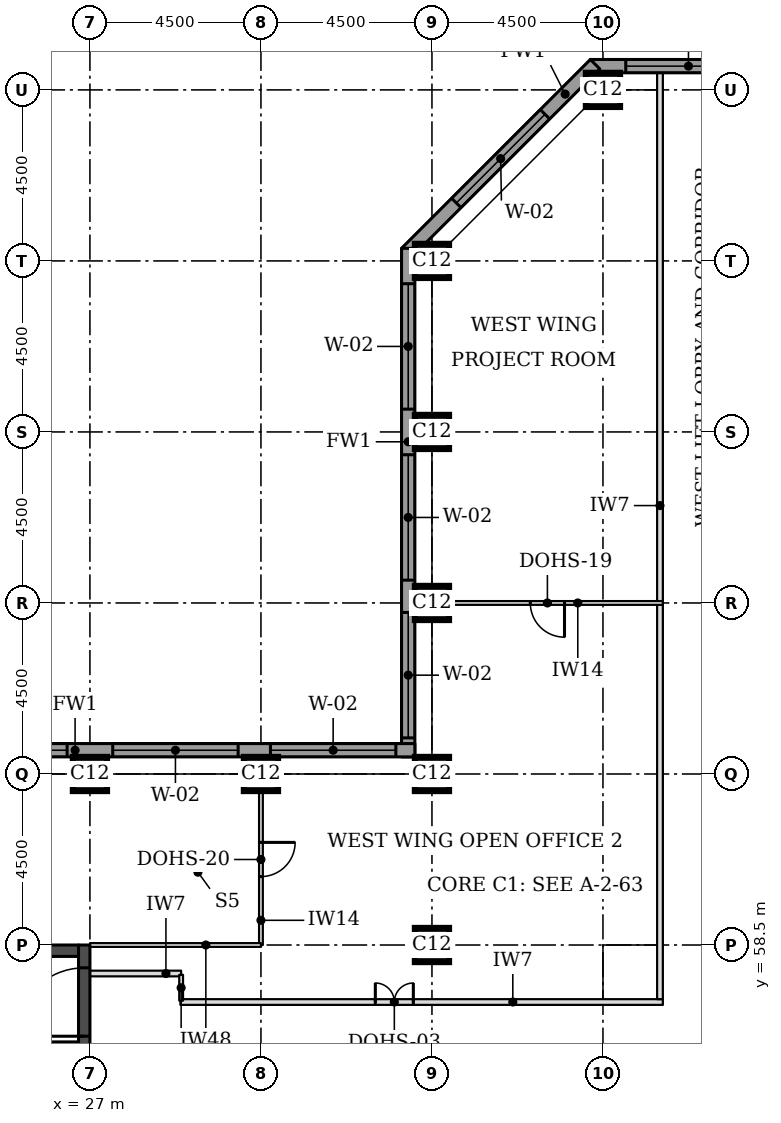
"""IFC4 building model, lengths in metres.
Left out: names, types, materials, properties, quantities, classifications, styles, units other than length and angle.
Written with IfcOpenShell. Run it as: python <this file> out.ifc"""

import sys

from ifc_helpers import new_model, si_unit, direction, frame, frame_2d, origin, origin_2d, place, context, subcontext, project, spatial, rectangle, extrude, element, fill, save


model = new_model("IFC4")
c1 = context("Model", 3, precision=1e-05, world=origin(), true_north=direction((0.0, 1.0)))
c2 = subcontext(c1, "Body", "Model", "MODEL_VIEW")
j1 = project(units=[si_unit("LENGTHUNIT", "METRE"), si_unit("PLANEANGLEUNIT", "RADIAN")], contexts=[c1])
p1 = place(None, origin())
s1 = spatial("IfcSite", under=j1, at=p1, CompositionType="ELEMENT")
p2 = place(p1, origin())
s2 = spatial("IfcBuilding", under=s1, at=p2, CompositionType="ELEMENT")
p3 = place(p2, frame((0.0, 0.0, 260.0)))
s3 = spatial("IfcBuildingStorey", under=s2, at=p3, CompositionType="ELEMENT", Elevation=260.0)
for number, where, z_axis, x_axis in (
    (1, (36.0, 58.5, 0.0), (0.0, 0.0, 1.0), (1.0, 0.0, 0.0)),
    (2, (27.0, 63.0, 0.0), (0.0, 0.0, 1.0), (1.0, 0.0, 0.0)),
    (3, (31.5, 63.0, 0.0), (0.0, 0.0, 1.0), (1.0, 0.0, 0.0)),
    (4, (36.0, 63.0, 0.0), (0.0, 0.0, 1.0), (1.0, 0.0, 0.0)),
    (5, (36.0, 67.5, 0.0), (0.0, 0.0, 1.0), (1.0, 0.0, 0.0)),
    (6, (36.0, 72.0, 0.0), (0.0, 0.0, 1.0), (1.0, 0.0, 0.0)),
    (7, (36.0, 76.5, 0.0), (0.0, 0.0, 1.0), (1.0, 0.0, 0.0)),
    (8, (40.5, 81.0, 0.0), (0.0, 0.0, 1.0), (1.0, 0.0, 0.0)),
):
    element("IfcColumn", number, at=place(p3, frame(where, z_axis=z_axis, x_axis=x_axis)), inside=s3, PredefinedType="COLUMN", context=c2, shape_type="SweptSolid", body=[
        extrude(rectangle(XDim=0.9, YDim=0.9, at=origin_2d()), origin(), (0.0, 0.0, 1.0), 3.7),
    ])
p4 = place(p3, frame((18.3, 58.35, 0.0), z_axis=(0.0, 0.0, 1.0), x_axis=(1.0, 0.0, 0.0)))
e9 = element("IfcWall", 9, at=p4, inside=s3, PredefinedType="SHEAR", context=c2, shape_type="SweptSolid", body=[
    extrude(rectangle(XDim=8.4, YDim=0.3, at=frame_2d((4.2, 0.0))), origin(), (0.0, 0.0, 1.0), 3.7),
])
p5 = place(p3, frame((26.85, 49.5, 0.0), z_axis=(0.0, 0.0, 1.0), x_axis=(0.0, 1.0, 0.0)))
e10 = element("IfcWall", 10, at=p5, inside=s3, PredefinedType="SHEAR", context=c2, shape_type="SweptSolid", body=[
    extrude(rectangle(XDim=9.0, YDim=0.3, at=frame_2d((4.5, 0.0))), origin(), (0.0, 0.0, 1.0), 3.7),
])
p6 = place(p5, frame((6.6, 0.0, 0.0)))
e11 = element("IfcOpeningElement", 11, at=p6, cuts=e10, PredefinedType="OPENING", context=c2, shape_type="SweptSolid", body=[
    extrude(rectangle(XDim=1.8, YDim=2.1, at=frame_2d((0.9, 1.05))), frame((0.0, 0.16, 0.0), z_axis=(0.0, -1.0, 0.0), x_axis=(1.0, 0.0, 0.0)), (0.0, 0.0, 1.0), 0.32),
])
p7 = place(p3, frame((72.331, 81.625, 0.0), z_axis=(0.0, 0.0, 1.0), x_axis=(-1.0, 0.0, 0.0)))
e12 = element("IfcWall", 12, at=p7, inside=s3, PredefinedType="STANDARD", context=c2, shape_type="SweptSolid", body=[
    extrude(rectangle(XDim=32.163, YDim=0.35, at=frame_2d((16.081, 0.0))), origin(), (0.0, 0.0, 1.0), 3.425),
])
p8 = place(p7, frame((0.931, 0.0, 0.9)))
e13 = element("IfcOpeningElement", 13, at=p8, cuts=e12, PredefinedType="OPENING", context=c2, shape_type="SweptSolid", body=[
    extrude(rectangle(XDim=3.3, YDim=1.9, at=frame_2d((1.65, 0.95))), frame((0.0, 0.185, 0.0), z_axis=(0.0, -1.0, 0.0), x_axis=(1.0, 0.0, 0.0)), (0.0, 0.0, 1.0), 0.37),
])
p9 = place(p7, frame((5.431, 0.0, 0.9)))
e14 = element("IfcOpeningElement", 14, at=p9, cuts=e12, PredefinedType="OPENING", context=c2, shape_type="SweptSolid", body=[
    extrude(rectangle(XDim=3.3, YDim=1.9, at=frame_2d((1.65, 0.95))), frame((0.0, 0.185, 0.0), z_axis=(0.0, -1.0, 0.0), x_axis=(1.0, 0.0, 0.0)), (0.0, 0.0, 1.0), 0.37),
])
p10 = place(p7, frame((9.931, 0.0, 0.9)))
e15 = element("IfcOpeningElement", 15, at=p10, cuts=e12, PredefinedType="OPENING", context=c2, shape_type="SweptSolid", body=[
    extrude(rectangle(XDim=3.3, YDim=1.9, at=frame_2d((1.65, 0.95))), frame((0.0, 0.185, 0.0), z_axis=(0.0, -1.0, 0.0), x_axis=(1.0, 0.0, 0.0)), (0.0, 0.0, 1.0), 0.37),
])
p11 = place(p7, frame((14.431, 0.0, 0.9)))
e16 = element("IfcOpeningElement", 16, at=p11, cuts=e12, PredefinedType="OPENING", context=c2, shape_type="SweptSolid", body=[
    extrude(rectangle(XDim=3.3, YDim=1.9, at=frame_2d((1.65, 0.95))), frame((0.0, 0.185, 0.0), z_axis=(0.0, -1.0, 0.0), x_axis=(1.0, 0.0, 0.0)), (0.0, 0.0, 1.0), 0.37),
])
p12 = place(p7, frame((18.931, 0.0, 0.9)))
e17 = element("IfcOpeningElement", 17, at=p12, cuts=e12, PredefinedType="OPENING", context=c2, shape_type="SweptSolid", body=[
    extrude(rectangle(XDim=3.3, YDim=1.9, at=frame_2d((1.65, 0.95))), frame((0.0, 0.185, 0.0), z_axis=(0.0, -1.0, 0.0), x_axis=(1.0, 0.0, 0.0)), (0.0, 0.0, 1.0), 0.37),
])
p13 = place(p7, frame((23.431, 0.0, 0.9)))
e18 = element("IfcOpeningElement", 18, at=p13, cuts=e12, PredefinedType="OPENING", context=c2, shape_type="SweptSolid", body=[
    extrude(rectangle(XDim=3.3, YDim=1.9, at=frame_2d((1.65, 0.95))), frame((0.0, 0.185, 0.0), z_axis=(0.0, -1.0, 0.0), x_axis=(1.0, 0.0, 0.0)), (0.0, 0.0, 1.0), 0.37),
])
p14 = place(p7, frame((27.931, 0.0, 0.9)))
e19 = element("IfcOpeningElement", 19, at=p14, cuts=e12, PredefinedType="OPENING", context=c2, shape_type="SweptSolid", body=[
    extrude(rectangle(XDim=3.3, YDim=1.9, at=frame_2d((1.65, 0.95))), frame((0.0, 0.185, 0.0), z_axis=(0.0, -1.0, 0.0), x_axis=(1.0, 0.0, 0.0)), (0.0, 0.0, 1.0), 0.37),
])
p15 = place(p3, frame((40.292, 81.676, 0.0), z_axis=(0.0, 0.0, 1.0), x_axis=(-0.707106781187, -0.707106781187, 0.0)))
e20 = element("IfcWall", 20, at=p15, inside=s3, PredefinedType="STANDARD", context=c2, shape_type="SweptSolid", body=[
    extrude(rectangle(XDim=7.027, YDim=0.35, at=frame_2d((3.513, 0.0))), origin(), (0.0, 0.0, 1.0), 3.425),
])
p16 = place(p15, frame((1.863, 0.0, 0.9)))
e21 = element("IfcOpeningElement", 21, at=p16, cuts=e20, PredefinedType="OPENING", context=c2, shape_type="SweptSolid", body=[
    extrude(rectangle(XDim=3.3, YDim=1.9, at=frame_2d((1.65, 0.95))), frame((0.0, 0.185, 0.0), z_axis=(0.0, -1.0, 0.0), x_axis=(1.0, 0.0, 0.0)), (0.0, 0.0, 1.0), 0.37),
])
p17 = place(p3, frame((35.375, 76.831, 0.0), z_axis=(0.0, 0.0, 1.0), x_axis=(0.0, -1.0, 0.0)))
e22 = element("IfcWall", 22, at=p17, inside=s3, PredefinedType="STANDARD", context=c2, shape_type="SweptSolid", body=[
    extrude(rectangle(XDim=13.381, YDim=0.35, at=frame_2d((6.691, 0.0))), origin(), (0.0, 0.0, 1.0), 3.425),
])
p18 = place(p17, frame((0.931, 0.0, 0.9)))
e23 = element("IfcOpeningElement", 23, at=p18, cuts=e22, PredefinedType="OPENING", context=c2, shape_type="SweptSolid", body=[
    extrude(rectangle(XDim=3.3, YDim=1.9, at=frame_2d((1.65, 0.95))), frame((0.0, 0.185, 0.0), z_axis=(0.0, -1.0, 0.0), x_axis=(1.0, 0.0, 0.0)), (0.0, 0.0, 1.0), 0.37),
])
p19 = place(p17, frame((5.431, 0.0, 0.9)))
e24 = element("IfcOpeningElement", 24, at=p19, cuts=e22, PredefinedType="OPENING", context=c2, shape_type="SweptSolid", body=[
    extrude(rectangle(XDim=3.3, YDim=1.9, at=frame_2d((1.65, 0.95))), frame((0.0, 0.185, 0.0), z_axis=(0.0, -1.0, 0.0), x_axis=(1.0, 0.0, 0.0)), (0.0, 0.0, 1.0), 0.37),
])
p20 = place(p17, frame((9.581, 0.0, 0.9)))
e25 = element("IfcOpeningElement", 25, at=p20, cuts=e22, PredefinedType="OPENING", context=c2, shape_type="SweptSolid", body=[
    extrude(rectangle(XDim=3.3, YDim=1.9, at=frame_2d((1.65, 0.95))), frame((0.0, 0.185, 0.0), z_axis=(0.0, -1.0, 0.0), x_axis=(1.0, 0.0, 0.0)), (0.0, 0.0, 1.0), 0.37),
])
p21 = place(p3, frame((35.55, 63.625, 0.0), z_axis=(0.0, 0.0, 1.0), x_axis=(-1.0, 0.0, 0.0)))
e26 = element("IfcWall", 26, at=p21, inside=s3, PredefinedType="STANDARD", context=c2, shape_type="SweptSolid", body=[
    extrude(rectangle(XDim=17.881, YDim=0.35, at=frame_2d((8.941, 0.0))), origin(), (0.0, 0.0, 1.0), 3.375),
])
p22 = place(p21, frame((0.5, 0.0, 0.9)))
e27 = element("IfcOpeningElement", 27, at=p22, cuts=e26, PredefinedType="OPENING", context=c2, shape_type="SweptSolid", body=[
    extrude(rectangle(XDim=3.3, YDim=1.9, at=frame_2d((1.65, 0.95))), frame((0.0, 0.185, 0.0), z_axis=(0.0, -1.0, 0.0), x_axis=(1.0, 0.0, 0.0)), (0.0, 0.0, 1.0), 0.37),
])
p23 = place(p21, frame((4.65, 0.0, 0.9)))
e28 = element("IfcOpeningElement", 28, at=p23, cuts=e26, PredefinedType="OPENING", context=c2, shape_type="SweptSolid", body=[
    extrude(rectangle(XDim=3.3, YDim=1.9, at=frame_2d((1.65, 0.95))), frame((0.0, 0.185, 0.0), z_axis=(0.0, -1.0, 0.0), x_axis=(1.0, 0.0, 0.0)), (0.0, 0.0, 1.0), 0.37),
])
p24 = place(p21, frame((9.15, 0.0, 0.9)))
e29 = element("IfcOpeningElement", 29, at=p24, cuts=e26, PredefinedType="OPENING", context=c2, shape_type="SweptSolid", body=[
    extrude(rectangle(XDim=3.3, YDim=1.9, at=frame_2d((1.65, 0.95))), frame((0.0, 0.185, 0.0), z_axis=(0.0, -1.0, 0.0), x_axis=(1.0, 0.0, 0.0)), (0.0, 0.0, 1.0), 0.37),
])
p25 = place(p21, frame((13.65, 0.0, 0.9)))
e30 = element("IfcOpeningElement", 30, at=p25, cuts=e26, PredefinedType="OPENING", context=c2, shape_type="SweptSolid", body=[
    extrude(rectangle(XDim=3.3, YDim=1.9, at=frame_2d((1.65, 0.95))), frame((0.0, 0.185, 0.0), z_axis=(0.0, -1.0, 0.0), x_axis=(1.0, 0.0, 0.0)), (0.0, 0.0, 1.0), 0.37),
])
p26 = place(p3, frame((29.38, 57.0, 0.0), z_axis=(0.0, 0.0, 1.0), x_axis=(1.0, 0.0, 0.0)))
e31 = element("IfcWall", 31, at=p26, inside=s3, PredefinedType="PARTITIONING", context=c2, shape_type="SweptSolid", body=[
    extrude(rectangle(XDim=12.695, YDim=0.15, at=frame_2d((6.348, 0.0))), origin(), (0.0, 0.0, 1.0), 3.45),
])
p27 = place(p26, frame((5.13, 0.0, 0.0)))
e32 = element("IfcOpeningElement", 32, at=p27, cuts=e31, PredefinedType="OPENING", context=c2, shape_type="SweptSolid", body=[
    extrude(rectangle(XDim=1.0, YDim=2.1, at=frame_2d((0.5, 1.05))), frame((0.0, 0.085, 0.0), z_axis=(0.0, -1.0, 0.0), x_axis=(1.0, 0.0, 0.0)), (0.0, 0.0, 1.0), 0.17),
])
p28 = place(p3, frame((42.0, 57.075, 0.0), z_axis=(0.0, 0.0, 1.0), x_axis=(0.0, 1.0, 0.0)))
e33 = element("IfcWall", 33, at=p28, inside=s3, PredefinedType="PARTITIONING", context=c2, shape_type="SweptSolid", body=[
    extrude(rectangle(XDim=24.375, YDim=0.15, at=frame_2d((12.188, 0.0))), origin(), (0.0, 0.0, 1.0), 3.45),
])
p29 = place(p3, frame((36.0, 67.5, 0.0), z_axis=(0.0, 0.0, 1.0), x_axis=(1.0, 0.0, 0.0)))
e34 = element("IfcWall", 34, at=p29, inside=s3, PredefinedType="PARTITIONING", context=c2, shape_type="SweptSolid", body=[
    extrude(rectangle(XDim=6.075, YDim=0.1, at=frame_2d((3.038, 0.0))), origin(), (0.0, 0.0, 1.0), 3.45),
])
p30 = place(p29, frame((2.588, 0.0, 0.0)))
e35 = element("IfcOpeningElement", 35, at=p30, cuts=e34, PredefinedType="OPENING", context=c2, shape_type="SweptSolid", body=[
    extrude(rectangle(XDim=0.9, YDim=2.1, at=frame_2d((0.45, 1.05))), frame((0.0, 0.06, 0.0), z_axis=(0.0, -1.0, 0.0), x_axis=(1.0, 0.0, 0.0)), (0.0, 0.0, 1.0), 0.12),
])
p31 = place(p3, frame((31.5, 63.0, 0.0), z_axis=(0.0, 0.0, 1.0), x_axis=(0.0, -1.0, 0.0)))
e36 = element("IfcWall", 36, at=p31, inside=s3, PredefinedType="PARTITIONING", context=c2, shape_type="SweptSolid", body=[
    extrude(rectangle(XDim=4.5, YDim=0.1, at=frame_2d((2.25, 0.0))), origin(), (0.0, 0.0, 1.0), 3.45),
])
p32 = place(p31, frame((1.8, 0.0, 0.0)))
e37 = element("IfcOpeningElement", 37, at=p32, cuts=e36, PredefinedType="OPENING", context=c2, shape_type="SweptSolid", body=[
    extrude(rectangle(XDim=0.9, YDim=2.1, at=frame_2d((0.45, 1.05))), frame((0.0, 0.06, 0.0), z_axis=(0.0, -1.0, 0.0), x_axis=(1.0, 0.0, 0.0)), (0.0, 0.0, 1.0), 0.12),
])
p33 = place(p3, frame((31.5, 58.5, 0.0), z_axis=(0.0, 0.0, 1.0), x_axis=(-1.0, 0.0, 0.0)))
e38 = element("IfcWall", 38, at=p33, inside=s3, PredefinedType="PARTITIONING", context=c2, shape_type="SweptSolid", body=[
    extrude(rectangle(XDim=4.5, YDim=0.1, at=frame_2d((2.25, 0.0))), origin(), (0.0, 0.0, 1.0), 2.4),
])
p34 = place(p3, frame((27.0, 57.75, 0.0), z_axis=(0.0, 0.0, 1.0), x_axis=(1.0, 0.0, 0.0)))
e39 = element("IfcWall", 39, at=p34, inside=s3, PredefinedType="PARTITIONING", context=c2, shape_type="SweptSolid", body=[
    extrude(rectangle(XDim=2.4, YDim=0.15, at=frame_2d((1.2, 0.0))), origin(), (0.0, 0.0, 1.0), 3.45),
])
p35 = place(p3, frame((29.4, 57.715, 0.0), z_axis=(0.0, 0.0, 1.0), x_axis=(0.0, -1.0, 0.0)))
e40 = element("IfcWall", 40, at=p35, inside=s3, PredefinedType="PARTITIONING", context=c2, shape_type="SweptSolid", body=[
    extrude(rectangle(XDim=0.68, YDim=0.1, at=frame_2d((0.34, 0.0))), origin(), (0.0, 0.0, 1.0), 3.45),
])
p36 = place(p3, frame((23.2, 55.85, 0.0), z_axis=(0.0, 0.0, 1.0), x_axis=(1.0, 0.0, 0.0)))
e41 = element("IfcWall", 41, at=p36, inside=s3, PredefinedType="SOLIDWALL", context=c2, shape_type="SweptSolid", body=[
    extrude(rectangle(XDim=3.5, YDim=0.2, at=frame_2d((1.75, 0.0))), origin(), (0.0, 0.0, 1.0), 3.45),
])
p37 = place(p36, frame((1.2, 0.0, 0.0)))
e42 = element("IfcOpeningElement", 42, at=p37, cuts=e41, PredefinedType="OPENING", context=c2, shape_type="SweptSolid", body=[
    extrude(rectangle(XDim=1.1, YDim=2.1, at=frame_2d((0.55, 1.05))), frame((0.0, 0.11, 0.0), z_axis=(0.0, -1.0, 0.0), x_axis=(1.0, 0.0, 0.0)), (0.0, 0.0, 1.0), 0.22),
])
p38 = place(p14, origin())
e43 = element("IfcWindow", 43, at=p38, inside=s3, PartitioningType="SINGLE_PANEL", PredefinedType="WINDOW", context=c2, shape_type="SweptSolid", body=[
    extrude(rectangle(XDim=3.3, YDim=1.9, at=frame_2d((1.65, 0.95))), frame((0.0, 0.085, 0.0), z_axis=(0.0, -1.0, 0.0), x_axis=(1.0, 0.0, 0.0)), (0.0, 0.0, 1.0), 0.06),
])
fill(e19, e43)
p39 = place(p16, origin())
e44 = element("IfcWindow", 44, at=p39, inside=s3, PartitioningType="SINGLE_PANEL", PredefinedType="WINDOW", context=c2, shape_type="SweptSolid", body=[
    extrude(rectangle(XDim=3.3, YDim=1.9, at=frame_2d((1.65, 0.95))), frame((0.0, 0.085, 0.0), z_axis=(0.0, -1.0, 0.0), x_axis=(1.0, 0.0, 0.0)), (0.0, 0.0, 1.0), 0.06),
])
fill(e21, e44)
p40 = place(p18, origin())
e45 = element("IfcWindow", 45, at=p40, inside=s3, PartitioningType="SINGLE_PANEL", PredefinedType="WINDOW", context=c2, shape_type="SweptSolid", body=[
    extrude(rectangle(XDim=3.3, YDim=1.9, at=frame_2d((1.65, 0.95))), frame((0.0, 0.085, 0.0), z_axis=(0.0, -1.0, 0.0), x_axis=(1.0, 0.0, 0.0)), (0.0, 0.0, 1.0), 0.06),
])
fill(e23, e45)
p41 = place(p19, origin())
e46 = element("IfcWindow", 46, at=p41, inside=s3, PartitioningType="SINGLE_PANEL", PredefinedType="WINDOW", context=c2, shape_type="SweptSolid", body=[
    extrude(rectangle(XDim=3.3, YDim=1.9, at=frame_2d((1.65, 0.95))), frame((0.0, 0.085, 0.0), z_axis=(0.0, -1.0, 0.0), x_axis=(1.0, 0.0, 0.0)), (0.0, 0.0, 1.0), 0.06),
])
fill(e24, e46)
p42 = place(p20, origin())
e47 = element("IfcWindow", 47, at=p42, inside=s3, PartitioningType="SINGLE_PANEL", PredefinedType="WINDOW", context=c2, shape_type="SweptSolid", body=[
    extrude(rectangle(XDim=3.3, YDim=1.9, at=frame_2d((1.65, 0.95))), frame((0.0, 0.085, 0.0), z_axis=(0.0, -1.0, 0.0), x_axis=(1.0, 0.0, 0.0)), (0.0, 0.0, 1.0), 0.06),
])
fill(e25, e47)
p43 = place(p22, origin())
e48 = element("IfcWindow", 48, at=p43, inside=s3, PartitioningType="SINGLE_PANEL", PredefinedType="WINDOW", context=c2, shape_type="SweptSolid", body=[
    extrude(rectangle(XDim=3.3, YDim=1.9, at=frame_2d((1.65, 0.95))), frame((0.0, 0.085, 0.0), z_axis=(0.0, -1.0, 0.0), x_axis=(1.0, 0.0, 0.0)), (0.0, 0.0, 1.0), 0.06),
])
fill(e27, e48)
p44 = place(p23, origin())
e49 = element("IfcWindow", 49, at=p44, inside=s3, PartitioningType="SINGLE_PANEL", PredefinedType="WINDOW", context=c2, shape_type="SweptSolid", body=[
    extrude(rectangle(XDim=3.3, YDim=1.9, at=frame_2d((1.65, 0.95))), frame((0.0, 0.085, 0.0), z_axis=(0.0, -1.0, 0.0), x_axis=(1.0, 0.0, 0.0)), (0.0, 0.0, 1.0), 0.06),
])
fill(e28, e49)
p45 = place(p24, origin())
e50 = element("IfcWindow", 50, at=p45, inside=s3, PartitioningType="SINGLE_PANEL", PredefinedType="WINDOW", context=c2, shape_type="SweptSolid", body=[
    extrude(rectangle(XDim=3.3, YDim=1.9, at=frame_2d((1.65, 0.95))), frame((0.0, 0.085, 0.0), z_axis=(0.0, -1.0, 0.0), x_axis=(1.0, 0.0, 0.0)), (0.0, 0.0, 1.0), 0.06),
])
fill(e29, e50)
p46 = place(p27, origin())
e51 = element("IfcDoor", 51, at=p46, inside=s3, OperationType="DOUBLE_DOOR_SINGLE_SWING", PredefinedType="DOOR", context=c2, shape_type="SweptSolid", body=[
    extrude(rectangle(XDim=1.0, YDim=2.1, at=frame_2d((0.5, 1.05))), frame((0.0, 0.025, 0.0), z_axis=(0.0, -1.0, 0.0), x_axis=(1.0, 0.0, 0.0)), (0.0, 0.0, 1.0), 0.05),
])
fill(e32, e51)
p47 = place(p32, origin())
e52 = element("IfcDoor", 52, at=p47, inside=s3, OperationType="SINGLE_SWING_LEFT", PredefinedType="DOOR", context=c2, shape_type="SweptSolid", body=[
    extrude(rectangle(XDim=0.9, YDim=2.1, at=frame_2d((0.45, 1.05))), frame((0.0, 0.025, 0.0), z_axis=(0.0, -1.0, 0.0), x_axis=(1.0, 0.0, 0.0)), (0.0, 0.0, 1.0), 0.05),
])
fill(e37, e52)
p48 = place(p30, frame((0.9, 0.0, 0.0), z_axis=(0.0, 0.0, 1.0), x_axis=(-1.0, 0.0, 0.0)))
e53 = element("IfcDoor", 53, at=p48, inside=s3, OperationType="SINGLE_SWING_LEFT", PredefinedType="DOOR", context=c2, shape_type="SweptSolid", body=[
    extrude(rectangle(XDim=0.9, YDim=2.1, at=frame_2d((0.45, 1.05))), frame((0.0, 0.025, 0.0), z_axis=(0.0, -1.0, 0.0), x_axis=(1.0, 0.0, 0.0)), (0.0, 0.0, 1.0), 0.05),
])
fill(e35, e53)
p49 = place(p6, origin())
e54 = element("IfcDoor", 54, at=p49, inside=s3, OperationType="SINGLE_SWING_LEFT", PredefinedType="DOOR", context=c2, shape_type="SweptSolid", body=[
    extrude(rectangle(XDim=1.8, YDim=2.1, at=frame_2d((0.9, 1.05))), frame((0.0, 0.025, 0.0), z_axis=(0.0, -1.0, 0.0), x_axis=(1.0, 0.0, 0.0)), (0.0, 0.0, 1.0), 0.05),
])
fill(e11, e54)
save(model, sys.argv[1])
